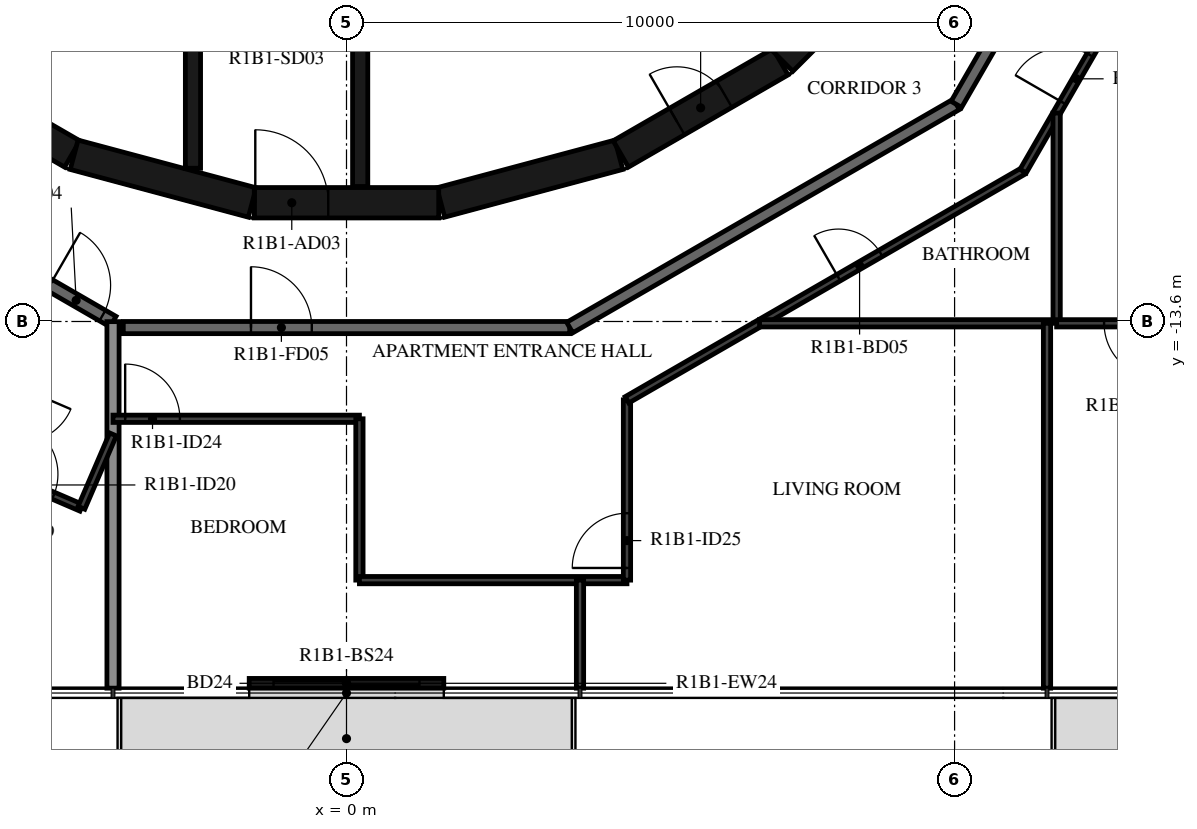
"""IFC4 building model, lengths in metres.
Left out: names, types, materials, properties, quantities, classifications, styles, units other than length and angle.
Written with IfcOpenShell. Run it as: python <this file> out.ifc"""

import sys

from ifc_helpers import new_model, si_unit, direction, frame, frame_2d, origin, place, context, subcontext, project, spatial, rectangle, extrude, element, fill, save


model = new_model("IFC4")
c1 = context("Model", 3, precision=1e-05, world=origin(), true_north=direction((0.0, 1.0)))
c2 = subcontext(c1, "Body", "Model", "MODEL_VIEW")
j1 = project(units=[si_unit("LENGTHUNIT", "METRE"), si_unit("PLANEANGLEUNIT", "RADIAN")], contexts=[c1])
p1 = place(None, origin())
s1 = spatial("IfcSite", under=j1, at=p1, CompositionType="ELEMENT")
p2 = place(p1, origin())
s2 = spatial("IfcBuilding", under=s1, at=p2, CompositionType="ELEMENT")
p3 = place(p2, frame((0.0, 0.0, 48.9)))
s3 = spatial("IfcBuildingStorey", under=s2, at=p3, CompositionType="ELEMENT", Elevation=48.9)
p4 = place(p3, frame((-1.6, -19.55, 0.0), z_axis=(0.0, 0.0, 1.0), x_axis=(1.0, 0.0, 0.0)))
e1 = element("IfcWall", 1, at=p4, inside=s3, PredefinedType="STANDARD", context=c2, shape_type="SweptSolid", body=[
    extrude(rectangle(XDim=3.2, YDim=0.16, at=frame_2d((1.6, 0.0))), origin(), (0.0, 0.0, 1.0), 3.12),
])
p5 = place(p4, frame((0.4, 0.0, 0.0)))
e2 = element("IfcOpeningElement", 2, at=p5, cuts=e1, PredefinedType="OPENING", context=c2, shape_type="SweptSolid", body=[
    extrude(rectangle(XDim=2.4, YDim=2.4, at=frame_2d((1.2, 1.2))), frame((0.0, 0.09, 0.0), z_axis=(0.0, -1.0, 0.0), x_axis=(1.0, 0.0, 0.0)), (0.0, 0.0, 1.0), 0.18),
])
p6 = place(p3, frame((1.55, -11.643, 0.0), z_axis=(0.0, 0.0, 1.0), x_axis=(0.965948410781, 0.258734743916, 0.0)))
e3 = element("IfcWall", 3, at=p6, inside=s3, PredefinedType="SHEAR", context=c2, shape_type="SweptSolid", body=[
    extrude(rectangle(XDim=3.033, YDim=0.5, at=frame_2d((1.516, 0.0))), origin(), (0.0, 0.0, 1.0), 3.12),
])
p7 = place(p3, frame((4.51, -10.845, 0.0), z_axis=(0.0, 0.0, 1.0), x_axis=(0.865975092491, 0.500087131594, 0.0)))
e4 = element("IfcWall", 4, at=p7, inside=s3, PredefinedType="SHEAR", context=c2, shape_type="SweptSolid", body=[
    extrude(rectangle(XDim=3.033, YDim=0.5, at=frame_2d((1.516, 0.0))), origin(), (0.0, 0.0, 1.0), 3.12),
])
p8 = place(p7, frame((1.066, 0.0, 0.0)))
e5 = element("IfcOpeningElement", 5, at=p8, cuts=e4, PredefinedType="OPENING", context=c2, shape_type="SweptSolid", body=[
    extrude(rectangle(XDim=0.9, YDim=2.1, at=frame_2d((0.45, 1.05))), frame((0.0, 0.26, 0.0), z_axis=(0.0, -1.0, 0.0), x_axis=(1.0, 0.0, 0.0)), (0.0, 0.0, 1.0), 0.52),
])
p9 = place(p3, frame((7.164, -9.308, 0.0), z_axis=(0.0, 0.0, 1.0), x_axis=(0.707106781187, 0.707106781187, 0.0)))
e6 = element("IfcWall", 6, at=p9, inside=s3, PredefinedType="SHEAR", context=c2, shape_type="SweptSolid", body=[
    extrude(rectangle(XDim=3.032, YDim=0.5, at=frame_2d((1.516, 0.0))), origin(), (0.0, 0.0, 1.0), 3.12),
])
for number, where, z_axis, x_axis in (
    (7, (-7.137, -9.329, 0.0), (0.0, 0.0, 1.0), (0.866, -0.5, 0.0)),
    (8, (-4.479, -10.858, 0.0), (0.0, 0.0, 1.0), (0.966, -0.259, 0.0)),
):
    element("IfcWall", number, at=place(p3, frame(where, z_axis=z_axis, x_axis=x_axis)), inside=s3, PredefinedType="SHEAR", context=c2, shape_type="SweptSolid", body=[
        extrude(rectangle(XDim=3.033, YDim=0.5, at=frame_2d((1.516, 0.0))), origin(), (0.0, 0.0, 1.0), 3.12),
    ])
p10 = place(p3, frame((-1.516, -11.647, 0.0), z_axis=(0.0, 0.0, 1.0), x_axis=(1.0, 0.0, 0.0)))
e9 = element("IfcWall", 9, at=p10, inside=s3, PredefinedType="SHEAR", context=c2, shape_type="SweptSolid", body=[
    extrude(rectangle(XDim=3.033, YDim=0.5, at=frame_2d((1.516, 0.0))), origin(), (0.0, 0.0, 1.0), 3.12),
])
p11 = place(p10, frame((0.016, 0.0, 0.0)))
e10 = element("IfcOpeningElement", 10, at=p11, cuts=e9, PredefinedType="OPENING", context=c2, shape_type="SweptSolid", body=[
    extrude(rectangle(XDim=1.2, YDim=2.1, at=frame_2d((0.6, 1.05))), frame((0.0, 0.26, 0.0), z_axis=(0.0, -1.0, 0.0), x_axis=(1.0, 0.0, 0.0)), (0.0, 0.0, 1.0), 0.52),
])
p12 = place(p3, frame((-2.525, -8.97, 0.0), z_axis=(0.0, 0.0, 1.0), x_axis=(0.0, -1.0, 0.0)))
e11 = element("IfcWall", 11, at=p12, inside=s3, PredefinedType="SHEAR", context=c2, shape_type="SweptSolid", body=[
    extrude(rectangle(XDim=2.11, YDim=0.25, at=frame_2d((1.055, 0.0))), origin(), (0.0, 0.0, 1.0), 3.12),
])
p13 = place(p3, frame((0.225, -8.97, 0.0), z_axis=(0.0, 0.0, 1.0), x_axis=(0.0, -1.0, 0.0)))
e12 = element("IfcWall", 12, at=p13, inside=s3, PredefinedType="SHEAR", context=c2, shape_type="SweptSolid", body=[
    extrude(rectangle(XDim=2.41, YDim=0.25, at=frame_2d((1.205, 0.0))), origin(), (0.0, 0.0, 1.0), 3.12),
])
p14 = place(p3, frame((-2.451, -6.495, 0.0), z_axis=(0.0, 0.0, 1.0), x_axis=(-0.853250115418, -0.521501908471, 0.0)))
e13 = element("IfcWall", 13, at=p14, inside=s3, PredefinedType="PARTITIONING", context=c2, shape_type="SweptSolid", body=[
    extrude(rectangle(XDim=5.137, YDim=0.15, at=frame_2d((2.569, 0.0))), origin(), (0.0, 0.0, 1.0), 3.12),
])
p15 = place(p14, frame((2.119, 0.0, 0.0)))
e14 = element("IfcOpeningElement", 14, at=p15, cuts=e13, PredefinedType="OPENING", context=c2, shape_type="SweptSolid", body=[
    extrude(rectangle(XDim=0.9, YDim=2.1, at=frame_2d((0.45, 1.05))), frame((0.0, 0.085, 0.0), z_axis=(0.0, -1.0, 0.0), x_axis=(1.0, 0.0, 0.0)), (0.0, 0.0, 1.0), 0.17),
])
p16 = place(p3, frame((-10.029, -10.029, 0.0), z_axis=(0.0, 0.0, 1.0), x_axis=(0.866022878987, -0.500004373052, 0.0)))
e15 = element("IfcWall", 15, at=p16, inside=s3, PredefinedType="STANDARD", context=c2, shape_type="SweptSolid", body=[
    extrude(rectangle(XDim=7.146, YDim=0.2, at=frame_2d((3.573, 0.0))), origin(), (0.0, 0.0, 1.0), 3.12),
])
p17 = place(p16, frame((5.947, 0.0, 0.0)))
e16 = element("IfcOpeningElement", 16, at=p17, cuts=e15, PredefinedType="OPENING", context=c2, shape_type="SweptSolid", body=[
    extrude(rectangle(XDim=1.0, YDim=2.1, at=frame_2d((0.5, 1.05))), frame((0.0, 0.11, 0.0), z_axis=(0.0, -1.0, 0.0), x_axis=(1.0, 0.0, 0.0)), (0.0, 0.0, 1.0), 0.22),
])
p18 = place(p3, frame((-3.671, -13.7, 0.0), z_axis=(0.0, 0.0, 1.0), x_axis=(1.0, 0.0, 0.0)))
e17 = element("IfcWall", 17, at=p18, inside=s3, PredefinedType="STANDARD", context=c2, shape_type="SweptSolid", body=[
    extrude(rectangle(XDim=7.342, YDim=0.2, at=frame_2d((3.671, 0.0))), origin(), (0.0, 0.0, 1.0), 3.12),
])
p19 = place(p18, frame((2.1, 0.0, 0.0)))
e18 = element("IfcOpeningElement", 18, at=p19, cuts=e17, PredefinedType="OPENING", context=c2, shape_type="SweptSolid", body=[
    extrude(rectangle(XDim=1.0, YDim=2.1, at=frame_2d((0.5, 1.05))), frame((0.0, 0.11, 0.0), z_axis=(0.0, -1.0, 0.0), x_axis=(1.0, 0.0, 0.0)), (0.0, 0.0, 1.0), 0.22),
])
p20 = place(p3, frame((3.671, -13.7, 0.0), z_axis=(0.0, 0.0, 1.0), x_axis=(0.866024439905, 0.500001669485, 0.0)))
e19 = element("IfcWall", 19, at=p20, inside=s3, PredefinedType="STANDARD", context=c2, shape_type="SweptSolid", body=[
    extrude(rectangle(XDim=7.342, YDim=0.2, at=frame_2d((3.671, 0.0))), origin(), (0.0, 0.0, 1.0), 3.12),
])
p21 = place(p3, frame((10.029, -10.029, 0.0), z_axis=(0.0, 0.0, 1.0), x_axis=(0.50001606911, 0.866016126081, 0.0)))
e20 = element("IfcWall", 20, at=p21, inside=s3, PredefinedType="STANDARD", context=c2, shape_type="SweptSolid", body=[
    extrude(rectangle(XDim=3.671, YDim=0.2, at=frame_2d((1.835, 0.0))), origin(), (0.0, 0.0, 1.0), 3.12),
])
p22 = place(p3, frame((-3.84, -19.63, 0.0), z_axis=(0.0, 0.0, 1.0), x_axis=(0.0, 1.0, 0.0)))
e21 = element("IfcWall", 21, at=p22, inside=s3, PredefinedType="STANDARD", context=c2, shape_type="SweptSolid", body=[
    extrude(rectangle(XDim=6.028, YDim=0.2, at=frame_2d((3.014, 0.0))), origin(), (0.0, 0.0, 1.0), 2.73),
])
p23 = place(p3, frame((16.817, -9.709, 0.0), z_axis=(0.0, 0.0, 1.0), x_axis=(-0.86604338933, 0.499968846828, 0.0)))
e22 = element("IfcWall", 22, at=p23, inside=s3, PredefinedType="STANDARD", context=c2, shape_type="SweptSolid", body=[
    extrude(rectangle(XDim=5.718, YDim=0.2, at=frame_2d((2.859, 0.0))), origin(), (0.0, 0.0, 1.0), 3.12),
])
p24 = place(p3, frame((-5.921, -15.992, 0.0), z_axis=(0.0, 0.0, 1.0), x_axis=(0.918557080237, -0.395288363536, 0.0)))
e23 = element("IfcWall", 23, at=p24, inside=s3, PredefinedType="PARTITIONING", context=c2, shape_type="SweptSolid", body=[
    extrude(rectangle(XDim=1.7, YDim=0.12, at=frame_2d((0.85, 0.0))), origin(), (0.0, 0.0, 1.0), 3.12),
])
p25 = place(p24, frame((0.3, 0.0, 0.0)))
e24 = element("IfcOpeningElement", 24, at=p25, cuts=e23, PredefinedType="OPENING", context=c2, shape_type="SweptSolid", body=[
    extrude(rectangle(XDim=0.9, YDim=2.1, at=frame_2d((0.45, 1.05))), frame((0.0, 0.07, 0.0), z_axis=(0.0, -1.0, 0.0), x_axis=(1.0, 0.0, 0.0)), (0.0, 0.0, 1.0), 0.14),
])
p26 = place(p3, frame((-4.36, -16.664, 0.0), z_axis=(0.0, 0.0, 1.0), x_axis=(0.395353859705, 0.918528892097, 0.0)))
e25 = element("IfcWall", 25, at=p26, inside=s3, PredefinedType="PARTITIONING", context=c2, shape_type="SweptSolid", body=[
    extrude(rectangle(XDim=1.314, YDim=0.12, at=frame_2d((0.657, 0.0))), origin(), (0.0, 0.0, 1.0), 3.12),
])
p27 = place(p3, frame((-3.84, -15.2, 0.0), z_axis=(0.0, 0.0, 1.0), x_axis=(1.0, 0.0, 0.0)))
e26 = element("IfcWall", 26, at=p27, inside=s3, PredefinedType="PARTITIONING", context=c2, shape_type="SweptSolid", body=[
    extrude(rectangle(XDim=4.052, YDim=0.12, at=frame_2d((2.026, 0.0))), origin(), (0.0, 0.0, 1.0), 3.12),
])
p28 = place(p27, frame((0.2, 0.0, 0.0)))
e27 = element("IfcOpeningElement", 27, at=p28, cuts=e26, PredefinedType="OPENING", context=c2, shape_type="SweptSolid", body=[
    extrude(rectangle(XDim=0.9, YDim=2.1, at=frame_2d((0.45, 1.05))), frame((0.0, 0.07, 0.0), z_axis=(0.0, -1.0, 0.0), x_axis=(1.0, 0.0, 0.0)), (0.0, 0.0, 1.0), 0.14),
])
p29 = place(p3, frame((0.212, -15.2, 0.0), z_axis=(0.0, 0.0, 1.0), x_axis=(0.0, -1.0, 0.0)))
e28 = element("IfcWall", 28, at=p29, inside=s3, PredefinedType="PARTITIONING", context=c2, shape_type="SweptSolid", body=[
    extrude(rectangle(XDim=2.653, YDim=0.12, at=frame_2d((1.327, 0.0))), origin(), (0.0, 0.0, 1.0), 3.12),
])
p30 = place(p3, frame((0.212, -17.853, 0.0), z_axis=(0.0, 0.0, 1.0), x_axis=(1.0, 0.0, 0.0)))
e29 = element("IfcWall", 29, at=p30, inside=s3, PredefinedType="PARTITIONING", context=c2, shape_type="SweptSolid", body=[
    extrude(rectangle(XDim=4.4, YDim=0.12, at=frame_2d((2.2, 0.0))), origin(), (0.0, 0.0, 1.0), 3.12),
])
p31 = place(p3, frame((4.613, -17.853, 0.0), z_axis=(0.0, 0.0, 1.0), x_axis=(0.0, 1.0, 0.0)))
e30 = element("IfcWall", 30, at=p31, inside=s3, PredefinedType="PARTITIONING", context=c2, shape_type="SweptSolid", body=[
    extrude(rectangle(XDim=2.965, YDim=0.12, at=frame_2d((1.482, 0.0))), origin(), (0.0, 0.0, 1.0), 3.12),
])
p32 = place(p31, frame((0.2, 0.0, 0.0)))
e31 = element("IfcOpeningElement", 31, at=p32, cuts=e30, PredefinedType="OPENING", context=c2, shape_type="SweptSolid", body=[
    extrude(rectangle(XDim=0.9, YDim=2.1, at=frame_2d((0.45, 1.05))), frame((0.0, 0.07, 0.0), z_axis=(0.0, -1.0, 0.0), x_axis=(1.0, 0.0, 0.0)), (0.0, 0.0, 1.0), 0.14),
])
p33 = place(p3, frame((4.613, -14.888, 0.0), z_axis=(0.0, 0.0, 1.0), x_axis=(0.866025608725, 0.499999645032, 0.0)))
e32 = element("IfcWall", 32, at=p33, inside=s3, PredefinedType="PARTITIONING", context=c2, shape_type="SweptSolid", body=[
    extrude(rectangle(XDim=7.522, YDim=0.12, at=frame_2d((3.761, 0.0))), origin(), (0.0, 0.0, 1.0), 3.12),
])
p34 = place(p33, frame((4.017, 0.0, 0.0)))
e33 = element("IfcOpeningElement", 33, at=p34, cuts=e32, PredefinedType="OPENING", context=c2, shape_type="SweptSolid", body=[
    extrude(rectangle(XDim=0.8, YDim=2.1, at=frame_2d((0.4, 1.05))), frame((0.0, 0.07, 0.0), z_axis=(0.0, -1.0, 0.0), x_axis=(1.0, 0.0, 0.0)), (0.0, 0.0, 1.0), 0.14),
])
p35 = place(p3, frame((11.127, -11.127, 0.0), z_axis=(0.0, 0.0, 1.0), x_axis=(0.499987950692, 0.866032360344, 0.0)))
e34 = element("IfcWall", 34, at=p35, inside=s3, PredefinedType="PARTITIONING", context=c2, shape_type="SweptSolid", body=[
    extrude(rectangle(XDim=8.146, YDim=0.12, at=frame_2d((4.073, 0.0))), origin(), (0.0, 0.0, 1.0), 3.12),
])
p36 = place(p35, frame((1.303, 0.0, 0.0)))
e35 = element("IfcOpeningElement", 35, at=p36, cuts=e34, PredefinedType="OPENING", context=c2, shape_type="SweptSolid", body=[
    extrude(rectangle(XDim=0.9, YDim=2.1, at=frame_2d((0.45, 1.05))), frame((0.0, 0.07, 0.0), z_axis=(0.0, -1.0, 0.0), x_axis=(1.0, 0.0, 0.0)), (0.0, 0.0, 1.0), 0.14),
])
p37 = place(p35, frame((4.273, 0.0, 0.0)))
e36 = element("IfcOpeningElement", 36, at=p37, cuts=e34, PredefinedType="OPENING", context=c2, shape_type="SweptSolid", body=[
    extrude(rectangle(XDim=0.9, YDim=2.1, at=frame_2d((0.45, 1.05))), frame((0.0, 0.07, 0.0), z_axis=(0.0, -1.0, 0.0), x_axis=(1.0, 0.0, 0.0)), (0.0, 0.0, 1.0), 0.14),
])
p38 = place(p3, frame((3.84, -19.63, 0.0), z_axis=(0.0, 0.0, 1.0), x_axis=(0.0, 1.0, 0.0)))
e37 = element("IfcWall", 37, at=p38, inside=s3, PredefinedType="PARTITIONING", context=c2, shape_type="SweptSolid", body=[
    extrude(rectangle(XDim=1.777, YDim=0.12, at=frame_2d((0.888, 0.0))), origin(), (0.0, 0.0, 1.0), 2.73),
])
p39 = place(p3, frame((11.56, -13.63, 0.0), z_axis=(0.0, 0.0, 1.0), x_axis=(-1.0, 0.0, 0.0)))
e38 = element("IfcWall", 38, at=p39, inside=s3, PredefinedType="PARTITIONING", context=c2, shape_type="SweptSolid", body=[
    extrude(rectangle(XDim=4.768, YDim=0.12, at=frame_2d((2.384, 0.0))), origin(), (0.0, 0.0, 1.0), 3.12),
])
p40 = place(p3, frame((11.52, -19.63, 0.0), z_axis=(0.0, 0.0, 1.0), x_axis=(0.0, 1.0, 0.0)))
e39 = element("IfcWall", 39, at=p40, inside=s3, PredefinedType="PARTITIONING", context=c2, shape_type="SweptSolid", body=[
    extrude(rectangle(XDim=6.0, YDim=0.12, at=frame_2d((3.0, 0.0))), origin(), (0.0, 0.0, 1.0), 2.73),
])
p41 = place(p3, frame((11.678, -13.63, 0.0), z_axis=(0.0, 0.0, 1.0), x_axis=(0.0, 1.0, 0.0)))
e40 = element("IfcWall", 40, at=p41, inside=s3, PredefinedType="PARTITIONING", context=c2, shape_type="SweptSolid", body=[
    extrude(rectangle(XDim=3.458, YDim=0.12, at=frame_2d((1.729, 0.0))), origin(), (0.0, 0.0, 1.0), 3.12),
])
p42 = place(p3, frame((19.794, -13.63, 0.0), z_axis=(0.0, 0.0, 1.0), x_axis=(-1.0, 0.0, 0.0)))
e41 = element("IfcWall", 41, at=p42, inside=s3, PredefinedType="PARTITIONING", context=c2, shape_type="SweptSolid", body=[
    extrude(rectangle(XDim=8.116, YDim=0.12, at=frame_2d((4.058, 0.0))), origin(), (0.0, 0.0, 1.0), 3.12),
])
p43 = place(p42, frame((6.436, 0.0, 0.0)))
e42 = element("IfcOpeningElement", 42, at=p43, cuts=e41, PredefinedType="OPENING", context=c2, shape_type="SweptSolid", body=[
    extrude(rectangle(XDim=0.9, YDim=2.1, at=frame_2d((0.45, 1.05))), frame((0.0, 0.07, 0.0), z_axis=(0.0, -1.0, 0.0), x_axis=(1.0, 0.0, 0.0)), (0.0, 0.0, 1.0), 0.14),
])
p44 = place(p42, frame((1.6, 0.0, 0.0)))
e43 = element("IfcOpeningElement", 43, at=p44, cuts=e41, PredefinedType="OPENING", context=c2, shape_type="SweptSolid", body=[
    extrude(rectangle(XDim=0.9, YDim=2.1, at=frame_2d((0.45, 1.05))), frame((0.0, 0.07, 0.0), z_axis=(0.0, -1.0, 0.0), x_axis=(1.0, 0.0, 0.0)), (0.0, 0.0, 1.0), 0.14),
])
p45 = place(p5, origin())
e44 = element("IfcDoor", 44, at=p45, inside=s3, OperationType="DOUBLE_DOOR_SLIDING", PredefinedType="DOOR", context=c2, shape_type="SweptSolid", body=[
    extrude(rectangle(XDim=2.4, YDim=2.4, at=frame_2d((1.2, 1.2))), frame((0.0, 0.025, 0.0), z_axis=(0.0, -1.0, 0.0), x_axis=(1.0, 0.0, 0.0)), (0.0, 0.0, 1.0), 0.05),
])
fill(e2, e44)
p46 = place(p11, origin())
e45 = element("IfcDoor", 45, at=p46, inside=s3, OperationType="SINGLE_SWING_RIGHT", PredefinedType="DOOR", context=c2, shape_type="SweptSolid", body=[
    extrude(rectangle(XDim=1.2, YDim=2.1, at=frame_2d((0.6, 1.05))), frame((0.0, 0.025, 0.0), z_axis=(0.0, -1.0, 0.0), x_axis=(1.0, 0.0, 0.0)), (0.0, 0.0, 1.0), 0.05),
])
fill(e10, e45)
p47 = place(p8, origin())
e46 = element("IfcDoor", 46, at=p47, inside=s3, OperationType="SINGLE_SWING_LEFT", PredefinedType="DOOR", context=c2, shape_type="SweptSolid", body=[
    extrude(rectangle(XDim=0.9, YDim=2.1, at=frame_2d((0.45, 1.05))), frame((0.0, 0.025, 0.0), z_axis=(0.0, -1.0, 0.0), x_axis=(1.0, 0.0, 0.0)), (0.0, 0.0, 1.0), 0.05),
])
fill(e5, e46)
p48 = place(p17, origin())
e47 = element("IfcDoor", 47, at=p48, inside=s3, OperationType="SINGLE_SWING_LEFT", PredefinedType="DOOR", context=c2, shape_type="SweptSolid", body=[
    extrude(rectangle(XDim=1.0, YDim=2.1, at=frame_2d((0.5, 1.05))), frame((0.0, 0.025, 0.0), z_axis=(0.0, -1.0, 0.0), x_axis=(1.0, 0.0, 0.0)), (0.0, 0.0, 1.0), 0.05),
])
fill(e16, e47)
p49 = place(p25, origin())
e48 = element("IfcDoor", 48, at=p49, inside=s3, OperationType="SINGLE_SWING_LEFT", PredefinedType="DOOR", context=c2, shape_type="SweptSolid", body=[
    extrude(rectangle(XDim=0.9, YDim=2.1, at=frame_2d((0.45, 1.05))), frame((0.0, 0.025, 0.0), z_axis=(0.0, -1.0, 0.0), x_axis=(1.0, 0.0, 0.0)), (0.0, 0.0, 1.0), 0.05),
])
fill(e24, e48)
p50 = place(p19, origin())
e49 = element("IfcDoor", 49, at=p50, inside=s3, OperationType="SINGLE_SWING_LEFT", PredefinedType="DOOR", context=c2, shape_type="SweptSolid", body=[
    extrude(rectangle(XDim=1.0, YDim=2.1, at=frame_2d((0.5, 1.05))), frame((0.0, 0.025, 0.0), z_axis=(0.0, -1.0, 0.0), x_axis=(1.0, 0.0, 0.0)), (0.0, 0.0, 1.0), 0.05),
])
fill(e18, e49)
p51 = place(p28, origin())
e50 = element("IfcDoor", 50, at=p51, inside=s3, OperationType="SINGLE_SWING_LEFT", PredefinedType="DOOR", context=c2, shape_type="SweptSolid", body=[
    extrude(rectangle(XDim=0.9, YDim=2.1, at=frame_2d((0.45, 1.05))), frame((0.0, 0.025, 0.0), z_axis=(0.0, -1.0, 0.0), x_axis=(1.0, 0.0, 0.0)), (0.0, 0.0, 1.0), 0.05),
])
fill(e27, e50)
p52 = place(p32, origin())
e51 = element("IfcDoor", 51, at=p52, inside=s3, OperationType="SINGLE_SWING_RIGHT", PredefinedType="DOOR", context=c2, shape_type="SweptSolid", body=[
    extrude(rectangle(XDim=0.9, YDim=2.1, at=frame_2d((0.45, 1.05))), frame((0.0, 0.025, 0.0), z_axis=(0.0, -1.0, 0.0), x_axis=(1.0, 0.0, 0.0)), (0.0, 0.0, 1.0), 0.05),
])
fill(e31, e51)
p53 = place(p34, origin())
e52 = element("IfcDoor", 52, at=p53, inside=s3, OperationType="SINGLE_SWING_RIGHT", PredefinedType="DOOR", context=c2, shape_type="SweptSolid", body=[
    extrude(rectangle(XDim=0.8, YDim=2.1, at=frame_2d((0.4, 1.05))), frame((0.0, 0.025, 0.0), z_axis=(0.0, -1.0, 0.0), x_axis=(1.0, 0.0, 0.0)), (0.0, 0.0, 1.0), 0.05),
])
fill(e33, e52)
p54 = place(p36, origin())
e53 = element("IfcDoor", 53, at=p54, inside=s3, OperationType="SINGLE_SWING_RIGHT", PredefinedType="DOOR", context=c2, shape_type="SweptSolid", body=[
    extrude(rectangle(XDim=0.9, YDim=2.1, at=frame_2d((0.45, 1.05))), frame((0.0, 0.025, 0.0), z_axis=(0.0, -1.0, 0.0), x_axis=(1.0, 0.0, 0.0)), (0.0, 0.0, 1.0), 0.05),
])
fill(e35, e53)
p55 = place(p43, origin())
e54 = element("IfcDoor", 54, at=p55, inside=s3, OperationType="SINGLE_SWING_RIGHT", PredefinedType="DOOR", context=c2, shape_type="SweptSolid", body=[
    extrude(rectangle(XDim=0.9, YDim=2.1, at=frame_2d((0.45, 1.05))), frame((0.0, 0.025, 0.0), z_axis=(0.0, -1.0, 0.0), x_axis=(1.0, 0.0, 0.0)), (0.0, 0.0, 1.0), 0.05),
])
fill(e42, e54)
save(model, sys.argv[1])
